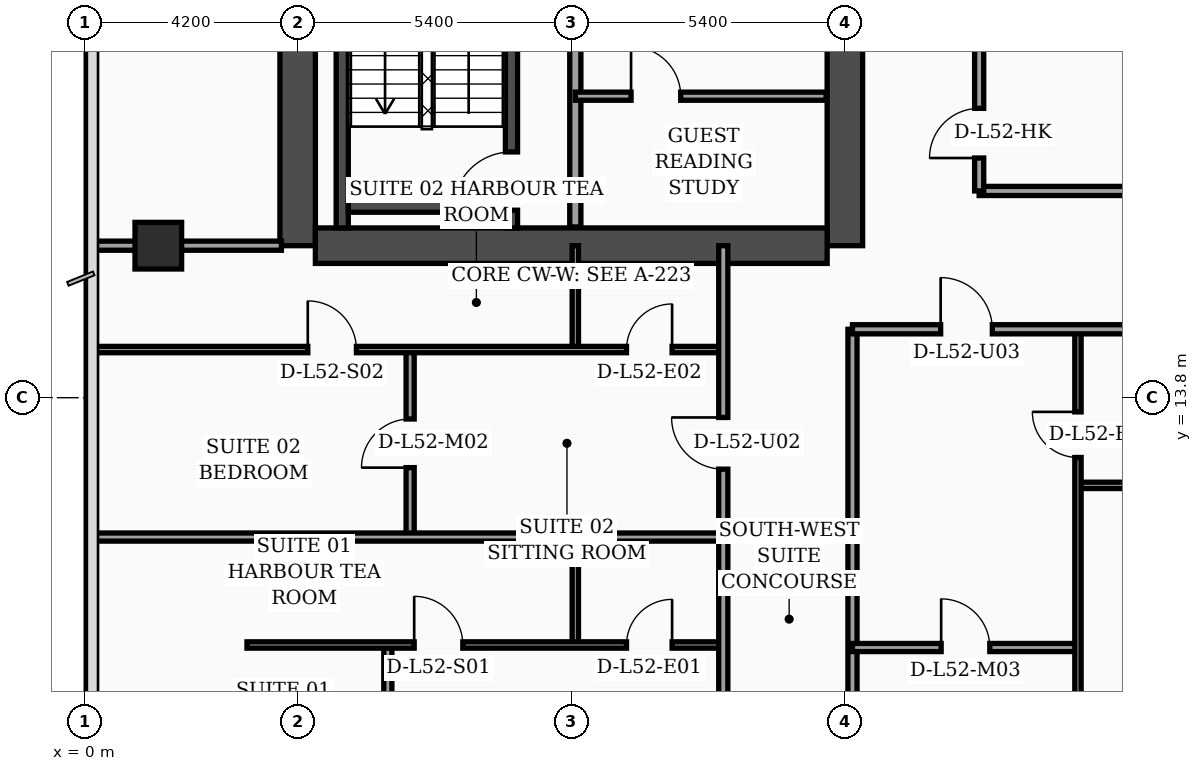
"""IFC4 building model, lengths in metres.
Left out: names, types, materials, properties, quantities, classifications, styles, units other than length and angle.
Written with IfcOpenShell. Run it as: python <this file> out.ifc"""

import sys

from ifc_helpers import new_model, si_unit, direction, frame, frame_2d, origin, origin_2d, place, context, subcontext, project, spatial, rectangle, extrude, element, fill, save


model = new_model("IFC4")
c1 = context("Model", 3, precision=1e-05, world=origin(), true_north=direction((0.0, 1.0)))
c2 = subcontext(c1, "Body", "Model", "MODEL_VIEW")
j1 = project(units=[si_unit("LENGTHUNIT", "METRE"), si_unit("PLANEANGLEUNIT", "RADIAN")], contexts=[c1])
p1 = place(None, origin())
s1 = spatial("IfcSite", under=j1, at=p1, CompositionType="ELEMENT")
p2 = place(p1, origin())
s2 = spatial("IfcBuilding", under=s1, at=p2, CompositionType="ELEMENT")
p3 = place(p2, frame((0.0, 0.0, 211.0)))
s3 = spatial("IfcBuildingStorey", under=s2, at=p3, CompositionType="ELEMENT", Elevation=211.0)
p4 = place(p3, frame((4.2, 16.8, 0.0), z_axis=(0.0, 0.0, 1.0), x_axis=(0.0, 1.0, 0.0)))
e1 = element("IfcWall", 1, at=p4, inside=s3, PredefinedType="SHEAR", context=c2, shape_type="SweptSolid", body=[
    extrude(rectangle(XDim=21.6, YDim=0.7, at=frame_2d((10.8, 0.0))), origin(), (0.0, 0.0, 1.0), 3.56),
])
p5 = place(p3, frame((15.0, 16.8, 0.0), z_axis=(0.0, 0.0, 1.0), x_axis=(0.0, 1.0, 0.0)))
e2 = element("IfcWall", 2, at=p5, inside=s3, PredefinedType="SHEAR", context=c2, shape_type="SweptSolid", body=[
    extrude(rectangle(XDim=21.6, YDim=0.7, at=frame_2d((10.8, 0.0))), origin(), (0.0, 0.0, 1.0), 3.56),
])
p6 = place(p5, frame((8.65, 0.0, 0.0)))
e3 = element("IfcOpeningElement", 3, at=p6, cuts=e2, PredefinedType="OPENING", context=c2, shape_type="SweptSolid", body=[
    extrude(rectangle(XDim=1.1, YDim=2.2, at=frame_2d((0.55, 1.1))), frame((0.0, 0.36, 0.0), z_axis=(0.0, -1.0, 0.0), x_axis=(1.0, 0.0, 0.0)), (0.0, 0.0, 1.0), 0.72),
])
p7 = place(p5, frame((10.85, 0.0, 0.0)))
e4 = element("IfcOpeningElement", 4, at=p7, cuts=e2, PredefinedType="OPENING", context=c2, shape_type="SweptSolid", body=[
    extrude(rectangle(XDim=1.1, YDim=2.2, at=frame_2d((0.55, 1.1))), frame((0.0, 0.36, 0.0), z_axis=(0.0, -1.0, 0.0), x_axis=(1.0, 0.0, 0.0)), (0.0, 0.0, 1.0), 0.72),
])
p8 = place(p5, frame((13.5, 0.0, 0.0)))
e5 = element("IfcOpeningElement", 5, at=p8, cuts=e2, PredefinedType="OPENING", context=c2, shape_type="SweptSolid", body=[
    extrude(rectangle(XDim=1.1, YDim=2.2, at=frame_2d((0.55, 1.1))), frame((0.0, 0.36, 0.0), z_axis=(0.0, -1.0, 0.0), x_axis=(1.0, 0.0, 0.0)), (0.0, 0.0, 1.0), 0.72),
])
p9 = place(p5, frame((16.15, 0.0, 0.0)))
e6 = element("IfcOpeningElement", 6, at=p9, cuts=e2, PredefinedType="OPENING", context=c2, shape_type="SweptSolid", body=[
    extrude(rectangle(XDim=1.1, YDim=2.2, at=frame_2d((0.55, 1.1))), frame((0.0, 0.36, 0.0), z_axis=(0.0, -1.0, 0.0), x_axis=(1.0, 0.0, 0.0)), (0.0, 0.0, 1.0), 0.72),
])
p10 = place(p3, frame((4.55, 16.8, 0.0), z_axis=(0.0, 0.0, 1.0), x_axis=(1.0, 0.0, 0.0)))
e7 = element("IfcWall", 7, at=p10, inside=s3, PredefinedType="SHEAR", context=c2, shape_type="SweptSolid", body=[
    extrude(rectangle(XDim=10.1, YDim=0.7, at=frame_2d((5.05, 0.0))), origin(), (0.0, 0.0, 1.0), 3.56),
])
p11 = place(p3, frame((5.08, 17.15, 0.0), z_axis=(0.0, 0.0, 1.0), x_axis=(0.0, 1.0, 0.0)))
e8 = element("IfcWall", 8, at=p11, inside=s3, PredefinedType="SOLIDWALL", context=c2, shape_type="SweptSolid", body=[
    extrude(rectangle(XDim=9.64, YDim=0.24, at=frame_2d((4.82, 0.0))), origin(), (0.0, 0.0, 1.0), 3.56),
])
p12 = place(p3, frame((8.42, 17.15, 0.0), z_axis=(0.0, 0.0, 1.0), x_axis=(0.0, 1.0, 0.0)))
e9 = element("IfcWall", 9, at=p12, inside=s3, PredefinedType="SOLIDWALL", context=c2, shape_type="SweptSolid", body=[
    extrude(rectangle(XDim=9.64, YDim=0.24, at=frame_2d((4.82, 0.0))), origin(), (0.0, 0.0, 1.0), 3.56),
])
p13 = place(p12, frame((0.35, 0.0, 0.0)))
e10 = element("IfcOpeningElement", 10, at=p13, cuts=e9, PredefinedType="OPENING", context=c2, shape_type="SweptSolid", body=[
    extrude(rectangle(XDim=1.15, YDim=2.2, at=frame_2d((0.575, 1.1))), frame((0.0, 0.13, 0.0), z_axis=(0.0, -1.0, 0.0), x_axis=(1.0, 0.0, 0.0)), (0.0, 0.0, 1.0), 0.26),
])
p14 = place(p3, frame((5.2, 17.58, 0.0), z_axis=(0.0, 0.0, 1.0), x_axis=(1.0, 0.0, 0.0)))
e11 = element("IfcWall", 11, at=p14, inside=s3, PredefinedType="SOLIDWALL", context=c2, shape_type="SweptSolid", body=[
    extrude(rectangle(XDim=3.1, YDim=0.24, at=frame_2d((1.55, 0.0))), origin(), (0.0, 0.0, 1.0), 3.56),
])
p15 = place(p3, frame((1.45, 16.8, 0.0), z_axis=(0.0, 0.0, 1.0), x_axis=(1.0, 0.0, 0.0)))
e12 = element("IfcColumn", 12, at=p15, inside=s3, PredefinedType="COLUMN", context=c2, shape_type="SweptSolid", body=[
    extrude(rectangle(XDim=0.92, YDim=0.92, at=origin_2d()), origin(), (0.0, 0.0, 1.0), 3.56),
])
p16 = place(p3, frame((9.68, 17.17, 0.0), z_axis=(0.0, 0.0, 1.0), x_axis=(0.0, 1.0, 0.0)))
e13 = element("IfcWall", 13, at=p16, inside=s3, PredefinedType="SOLIDWALL", context=c2, shape_type="SweptSolid", body=[
    extrude(rectangle(XDim=7.83, YDim=0.22, at=frame_2d((3.915, 0.0))), origin(), (0.0, 0.0, 1.0), 3.56),
])
p17 = place(p3, frame((9.68, 19.75, 0.0), z_axis=(0.0, 0.0, 1.0), x_axis=(1.0, 0.0, 0.0)))
e14 = element("IfcWall", 14, at=p17, inside=s3, PredefinedType="PARTITIONING", context=c2, shape_type="SweptSolid", body=[
    extrude(rectangle(XDim=4.95, YDim=0.16, at=frame_2d((2.475, 0.0))), origin(), (0.0, 0.0, 1.0), 3.56),
])
p18 = place(p17, frame((1.1, 0.0, 0.0)))
e15 = element("IfcOpeningElement", 15, at=p18, cuts=e14, PredefinedType="OPENING", context=c2, shape_type="SweptSolid", body=[
    extrude(rectangle(XDim=0.98, YDim=2.15, at=frame_2d((0.49, 1.075))), frame((0.0, 0.09, 0.0), z_axis=(0.0, -1.0, 0.0), x_axis=(1.0, 0.0, 0.0)), (0.0, 0.0, 1.0), 0.18),
])
p19 = place(p3, frame((0.08, 16.8, 0.0), z_axis=(0.0, 0.0, 1.0), x_axis=(1.0, 0.0, 0.0)))
e16 = element("IfcWall", 16, at=p19, inside=s3, PredefinedType="PARTITIONING", context=c2, shape_type="SweptSolid", body=[
    extrude(rectangle(XDim=3.8, YDim=0.18, at=frame_2d((1.9, 0.0))), origin(), (0.0, 0.0, 1.0), 2.94),
])
p20 = place(p3, frame((9.68, 8.92, 0.0), z_axis=(0.0, 0.0, 1.0), x_axis=(0.0, 1.0, 0.0)))
e17 = element("IfcWall", 17, at=p20, inside=s3, PredefinedType="PARTITIONING", context=c2, shape_type="SweptSolid", body=[
    extrude(rectangle(XDim=2.13, YDim=0.125, at=frame_2d((1.065, 0.0))), origin(), (0.0, 0.0, 1.0), 3.09),
])
p21 = place(p3, frame((5.98, 2.44, 0.0), z_axis=(0.0, 0.0, 1.0), x_axis=(0.0, 1.0, 0.0)))
e18 = element("IfcWall", 18, at=p21, inside=s3, PredefinedType="PARTITIONING", context=c2, shape_type="SweptSolid", body=[
    extrude(rectangle(XDim=6.48, YDim=0.16, at=frame_2d((3.24, 0.0))), origin(), (0.0, 0.0, 1.0), 3.09),
])
p22 = place(p21, frame((2.76, 0.0, 0.0)))
e19 = element("IfcOpeningElement", 19, at=p22, cuts=e18, PredefinedType="OPENING", context=c2, shape_type="SweptSolid", body=[
    extrude(rectangle(XDim=0.96, YDim=2.2, at=frame_2d((0.48, 1.1))), frame((0.0, 0.09, 0.0), z_axis=(0.0, -1.0, 0.0), x_axis=(1.0, 0.0, 0.0)), (0.0, 0.0, 1.0), 0.18),
])
p23 = place(p3, frame((3.2, 8.92, 0.0), z_axis=(0.0, 0.0, 1.0), x_axis=(1.0, 0.0, 0.0)))
e20 = element("IfcWall", 20, at=p23, inside=s3, PredefinedType="PARTITIONING", context=c2, shape_type="SweptSolid", body=[
    extrude(rectangle(XDim=9.4, YDim=0.125, at=frame_2d((4.7, 0.0))), origin(), (0.0, 0.0, 1.0), 2.94),
])
p24 = place(p23, frame((3.3, 0.0, 0.0)))
e21 = element("IfcOpeningElement", 21, at=p24, cuts=e20, PredefinedType="OPENING", context=c2, shape_type="SweptSolid", body=[
    extrude(rectangle(XDim=0.96, YDim=2.2, at=frame_2d((0.48, 1.1))), frame((0.0, 0.073, 0.0), z_axis=(0.0, -1.0, 0.0), x_axis=(1.0, 0.0, 0.0)), (0.0, 0.0, 1.0), 0.145),
])
p25 = place(p23, frame((7.49, 0.0, 0.0)))
e22 = element("IfcOpeningElement", 22, at=p25, cuts=e20, PredefinedType="OPENING", context=c2, shape_type="SweptSolid", body=[
    extrude(rectangle(XDim=0.9, YDim=2.15, at=frame_2d((0.45, 1.075))), frame((0.0, 0.073, 0.0), z_axis=(0.0, -1.0, 0.0), x_axis=(1.0, 0.0, 0.0)), (0.0, 0.0, 1.0), 0.145),
])
p26 = place(p3, frame((9.68, 14.75, 0.0), z_axis=(0.0, 0.0, 1.0), x_axis=(0.0, 1.0, 0.0)))
e23 = element("IfcWall", 23, at=p26, inside=s3, PredefinedType="PARTITIONING", context=c2, shape_type="SweptSolid", body=[
    extrude(rectangle(XDim=2.05, YDim=0.125, at=frame_2d((1.025, 0.0))), origin(), (0.0, 0.0, 1.0), 3.56),
])
p27 = place(p3, frame((6.42, 11.05, 0.0), z_axis=(0.0, 0.0, 1.0), x_axis=(0.0, 1.0, 0.0)))
e24 = element("IfcWall", 24, at=p27, inside=s3, PredefinedType="PARTITIONING", context=c2, shape_type="SweptSolid", body=[
    extrude(rectangle(XDim=3.7, YDim=0.16, at=frame_2d((1.85, 0.0))), origin(), (0.0, 0.0, 1.0), 3.56),
])
p28 = place(p27, frame((1.37, 0.0, 0.0)))
e25 = element("IfcOpeningElement", 25, at=p28, cuts=e24, PredefinedType="OPENING", context=c2, shape_type="SweptSolid", body=[
    extrude(rectangle(XDim=0.96, YDim=2.2, at=frame_2d((0.48, 1.1))), frame((0.0, 0.09, 0.0), z_axis=(0.0, -1.0, 0.0), x_axis=(1.0, 0.0, 0.0)), (0.0, 0.0, 1.0), 0.18),
])
p29 = place(p3, frame((0.08, 14.75, 0.0), z_axis=(0.0, 0.0, 1.0), x_axis=(1.0, 0.0, 0.0)))
e26 = element("IfcWall", 26, at=p29, inside=s3, PredefinedType="PARTITIONING", context=c2, shape_type="SweptSolid", body=[
    extrude(rectangle(XDim=12.52, YDim=0.125, at=frame_2d((6.26, 0.0))), origin(), (0.0, 0.0, 1.0), 2.94),
])
p30 = place(p29, frame((4.32, 0.0, 0.0)))
e27 = element("IfcOpeningElement", 27, at=p30, cuts=e26, PredefinedType="OPENING", context=c2, shape_type="SweptSolid", body=[
    extrude(rectangle(XDim=0.96, YDim=2.2, at=frame_2d((0.48, 1.1))), frame((0.0, 0.073, 0.0), z_axis=(0.0, -1.0, 0.0), x_axis=(1.0, 0.0, 0.0)), (0.0, 0.0, 1.0), 0.145),
])
p31 = place(p29, frame((10.61, 0.0, 0.0)))
e28 = element("IfcOpeningElement", 28, at=p31, cuts=e26, PredefinedType="OPENING", context=c2, shape_type="SweptSolid", body=[
    extrude(rectangle(XDim=0.9, YDim=2.15, at=frame_2d((0.45, 1.075))), frame((0.0, 0.073, 0.0), z_axis=(0.0, -1.0, 0.0), x_axis=(1.0, 0.0, 0.0)), (0.0, 0.0, 1.0), 0.145),
])
p32 = place(p3, frame((0.08, 11.05, 0.0), z_axis=(0.0, 0.0, 1.0), x_axis=(1.0, 0.0, 0.0)))
e29 = element("IfcWall", 29, at=p32, inside=s3, PredefinedType="PARTITIONING", context=c2, shape_type="SweptSolid", body=[
    extrude(rectangle(XDim=12.52, YDim=0.16, at=frame_2d((6.26, 0.0))), origin(), (0.0, 0.0, 1.0), 2.94),
])
p33 = place(p3, frame((12.6, 2.44, 0.0), z_axis=(0.0, 0.0, 1.0), x_axis=(0.0, 1.0, 0.0)))
e30 = element("IfcWall", 30, at=p33, inside=s3, PredefinedType="PARTITIONING", context=c2, shape_type="SweptSolid", body=[
    extrude(rectangle(XDim=14.36, YDim=0.18, at=frame_2d((7.18, 0.0))), origin(), (0.0, 0.0, 1.0), 2.94),
])
p34 = place(p33, frame((3.01, 0.0, 0.0)))
e31 = element("IfcOpeningElement", 31, at=p34, cuts=e30, PredefinedType="OPENING", context=c2, shape_type="SweptSolid", body=[
    extrude(rectangle(XDim=1.02, YDim=2.2, at=frame_2d((0.51, 1.1))), frame((0.0, 0.1, 0.0), z_axis=(0.0, -1.0, 0.0), x_axis=(1.0, 0.0, 0.0)), (0.0, 0.0, 1.0), 0.2),
])
p35 = place(p33, frame((9.95, 0.0, 0.0)))
e32 = element("IfcOpeningElement", 32, at=p35, cuts=e30, PredefinedType="OPENING", context=c2, shape_type="SweptSolid", body=[
    extrude(rectangle(XDim=1.02, YDim=2.2, at=frame_2d((0.51, 1.1))), frame((0.0, 0.1, 0.0), z_axis=(0.0, -1.0, 0.0), x_axis=(1.0, 0.0, 0.0)), (0.0, 0.0, 1.0), 0.2),
])
p36 = place(p3, frame((15.15, 2.44, 0.0), z_axis=(0.0, 0.0, 1.0), x_axis=(0.0, 1.0, 0.0)))
e33 = element("IfcWall", 33, at=p36, inside=s3, PredefinedType="PARTITIONING", context=c2, shape_type="SweptSolid", body=[
    extrude(rectangle(XDim=12.71, YDim=0.18, at=frame_2d((6.355, 0.0))), origin(), (0.0, 0.0, 1.0), 3.09),
])
p37 = place(p3, frame((19.6, 12.07, 0.0), z_axis=(0.0, 0.0, 1.0), x_axis=(1.0, 0.0, 0.0)))
e34 = element("IfcWall", 34, at=p37, inside=s3, PredefinedType="PARTITIONING", context=c2, shape_type="SweptSolid", body=[
    extrude(rectangle(XDim=2.0, YDim=0.125, at=frame_2d((1.0, 0.0))), origin(), (0.0, 0.0, 1.0), 3.56),
])
p38 = place(p3, frame((15.15, 8.87, 0.0), z_axis=(0.0, 0.0, 1.0), x_axis=(1.0, 0.0, 0.0)))
e35 = element("IfcWall", 35, at=p38, inside=s3, PredefinedType="PARTITIONING", context=c2, shape_type="SweptSolid", body=[
    extrude(rectangle(XDim=4.45, YDim=0.16, at=frame_2d((2.225, 0.0))), origin(), (0.0, 0.0, 1.0), 3.56),
])
p39 = place(p38, frame((1.75, 0.0, 0.0)))
e36 = element("IfcOpeningElement", 36, at=p39, cuts=e35, PredefinedType="OPENING", context=c2, shape_type="SweptSolid", body=[
    extrude(rectangle(XDim=0.96, YDim=2.2, at=frame_2d((0.48, 1.1))), frame((0.0, 0.09, 0.0), z_axis=(0.0, -1.0, 0.0), x_axis=(1.0, 0.0, 0.0)), (0.0, 0.0, 1.0), 0.18),
])
p40 = place(p3, frame((19.6, 2.44, 0.0), z_axis=(0.0, 0.0, 1.0), x_axis=(0.0, 1.0, 0.0)))
e37 = element("IfcWall", 37, at=p40, inside=s3, PredefinedType="PARTITIONING", context=c2, shape_type="SweptSolid", body=[
    extrude(rectangle(XDim=12.71, YDim=0.125, at=frame_2d((6.355, 0.0))), origin(), (0.0, 0.0, 1.0), 2.59),
])
p41 = place(p40, frame((4.34, 0.0, 0.0)))
e38 = element("IfcOpeningElement", 38, at=p41, cuts=e37, PredefinedType="OPENING", context=c2, shape_type="SweptSolid", body=[
    extrude(rectangle(XDim=0.96, YDim=2.2, at=frame_2d((0.48, 1.1))), frame((0.0, 0.073, 0.0), z_axis=(0.0, -1.0, 0.0), x_axis=(1.0, 0.0, 0.0)), (0.0, 0.0, 1.0), 0.145),
])
p42 = place(p40, frame((10.18, 0.0, 0.0)))
e39 = element("IfcOpeningElement", 39, at=p42, cuts=e37, PredefinedType="OPENING", context=c2, shape_type="SweptSolid", body=[
    extrude(rectangle(XDim=0.9, YDim=2.15, at=frame_2d((0.45, 1.075))), frame((0.0, 0.073, 0.0), z_axis=(0.0, -1.0, 0.0), x_axis=(1.0, 0.0, 0.0)), (0.0, 0.0, 1.0), 0.145),
])
p43 = place(p3, frame((15.15, 15.15, 0.0), z_axis=(0.0, 0.0, 1.0), x_axis=(1.0, 0.0, 0.0)))
e40 = element("IfcWall", 40, at=p43, inside=s3, PredefinedType="PARTITIONING", context=c2, shape_type="SweptSolid", body=[
    extrude(rectangle(XDim=6.45, YDim=0.18, at=frame_2d((3.225, 0.0))), origin(), (0.0, 0.0, 1.0), 2.59),
])
p44 = place(p43, frame((1.74, 0.0, 0.0)))
e41 = element("IfcOpeningElement", 41, at=p44, cuts=e40, PredefinedType="OPENING", context=c2, shape_type="SweptSolid", body=[
    extrude(rectangle(XDim=1.02, YDim=2.2, at=frame_2d((0.51, 1.1))), frame((0.0, 0.1, 0.0), z_axis=(0.0, -1.0, 0.0), x_axis=(1.0, 0.0, 0.0)), (0.0, 0.0, 1.0), 0.2),
])
p45 = place(p3, frame((17.65, 17.88, 0.0), z_axis=(0.0, 0.0, 1.0), x_axis=(1.0, 0.0, 0.0)))
e42 = element("IfcWall", 42, at=p45, inside=s3, PredefinedType="PARTITIONING", context=c2, shape_type="SweptSolid", body=[
    extrude(rectangle(XDim=3.9, YDim=0.18, at=frame_2d((1.95, 0.0))), origin(), (0.0, 0.0, 1.0), 3.56),
])
p46 = place(p3, frame((17.65, 17.88, 0.0), z_axis=(0.0, 0.0, 1.0), x_axis=(0.0, 1.0, 0.0)))
e43 = element("IfcWall", 43, at=p46, inside=s3, PredefinedType="PARTITIONING", context=c2, shape_type="SweptSolid", body=[
    extrude(rectangle(XDim=6.44, YDim=0.18, at=frame_2d((3.22, 0.0))), origin(), (0.0, 0.0, 1.0), 3.56),
])
p47 = place(p46, frame((0.65, 0.0, 0.0)))
e44 = element("IfcOpeningElement", 44, at=p47, cuts=e43, PredefinedType="OPENING", context=c2, shape_type="SweptSolid", body=[
    extrude(rectangle(XDim=0.98, YDim=2.15, at=frame_2d((0.49, 1.075))), frame((0.0, 0.1, 0.0), z_axis=(0.0, -1.0, 0.0), x_axis=(1.0, 0.0, 0.0)), (0.0, 0.0, 1.0), 0.2),
])
p48 = place(p46, frame((3.97, 0.0, 0.0)))
e45 = element("IfcOpeningElement", 45, at=p48, cuts=e43, PredefinedType="OPENING", context=c2, shape_type="SweptSolid", body=[
    extrude(rectangle(XDim=0.96, YDim=2.2, at=frame_2d((0.48, 1.1))), frame((0.0, 0.1, 0.0), z_axis=(0.0, -1.0, 0.0), x_axis=(1.0, 0.0, 0.0)), (0.0, 0.0, 1.0), 0.2),
])
p49 = place(p18, origin())
e46 = element("IfcDoor", 46, at=p49, inside=s3, OperationType="SINGLE_SWING_LEFT", PredefinedType="DOOR", context=c2, shape_type="SweptSolid", body=[
    extrude(rectangle(XDim=0.98, YDim=2.15, at=frame_2d((0.49, 1.075))), frame((0.0, 0.025, 0.0), z_axis=(0.0, -1.0, 0.0), x_axis=(1.0, 0.0, 0.0)), (0.0, 0.0, 1.0), 0.05),
])
fill(e15, e46)
p50 = place(p24, origin())
e47 = element("IfcDoor", 47, at=p50, inside=s3, OperationType="SINGLE_SWING_LEFT", PredefinedType="DOOR", context=c2, shape_type="SweptSolid", body=[
    extrude(rectangle(XDim=0.96, YDim=2.2, at=frame_2d((0.48, 1.1))), frame((0.0, 0.025, 0.0), z_axis=(0.0, -1.0, 0.0), x_axis=(1.0, 0.0, 0.0)), (0.0, 0.0, 1.0), 0.05),
])
fill(e21, e47)
p51 = place(p25, origin())
e48 = element("IfcDoor", 48, at=p51, inside=s3, OperationType="SINGLE_SWING_RIGHT", PredefinedType="DOOR", context=c2, shape_type="SweptSolid", body=[
    extrude(rectangle(XDim=0.9, YDim=2.15, at=frame_2d((0.45, 1.075))), frame((0.0, 0.025, 0.0), z_axis=(0.0, -1.0, 0.0), x_axis=(1.0, 0.0, 0.0)), (0.0, 0.0, 1.0), 0.05),
])
fill(e22, e48)
p52 = place(p28, origin())
e49 = element("IfcDoor", 49, at=p52, inside=s3, OperationType="SINGLE_SWING_LEFT", PredefinedType="DOOR", context=c2, shape_type="SweptSolid", body=[
    extrude(rectangle(XDim=0.96, YDim=2.2, at=frame_2d((0.48, 1.1))), frame((0.0, 0.025, 0.0), z_axis=(0.0, -1.0, 0.0), x_axis=(1.0, 0.0, 0.0)), (0.0, 0.0, 1.0), 0.05),
])
fill(e25, e49)
p53 = place(p30, origin())
e50 = element("IfcDoor", 50, at=p53, inside=s3, OperationType="SINGLE_SWING_LEFT", PredefinedType="DOOR", context=c2, shape_type="SweptSolid", body=[
    extrude(rectangle(XDim=0.96, YDim=2.2, at=frame_2d((0.48, 1.1))), frame((0.0, 0.025, 0.0), z_axis=(0.0, -1.0, 0.0), x_axis=(1.0, 0.0, 0.0)), (0.0, 0.0, 1.0), 0.05),
])
fill(e27, e50)
p54 = place(p31, origin())
e51 = element("IfcDoor", 51, at=p54, inside=s3, OperationType="SINGLE_SWING_RIGHT", PredefinedType="DOOR", context=c2, shape_type="SweptSolid", body=[
    extrude(rectangle(XDim=0.9, YDim=2.15, at=frame_2d((0.45, 1.075))), frame((0.0, 0.025, 0.0), z_axis=(0.0, -1.0, 0.0), x_axis=(1.0, 0.0, 0.0)), (0.0, 0.0, 1.0), 0.05),
])
fill(e28, e51)
p55 = place(p35, origin())
e52 = element("IfcDoor", 52, at=p55, inside=s3, OperationType="SINGLE_SWING_RIGHT", PredefinedType="DOOR", context=c2, shape_type="SweptSolid", body=[
    extrude(rectangle(XDim=1.02, YDim=2.2, at=frame_2d((0.51, 1.1))), frame((0.0, 0.025, 0.0), z_axis=(0.0, -1.0, 0.0), x_axis=(1.0, 0.0, 0.0)), (0.0, 0.0, 1.0), 0.05),
])
fill(e32, e52)
p56 = place(p39, origin())
e53 = element("IfcDoor", 53, at=p56, inside=s3, OperationType="SINGLE_SWING_LEFT", PredefinedType="DOOR", context=c2, shape_type="SweptSolid", body=[
    extrude(rectangle(XDim=0.96, YDim=2.2, at=frame_2d((0.48, 1.1))), frame((0.0, 0.025, 0.0), z_axis=(0.0, -1.0, 0.0), x_axis=(1.0, 0.0, 0.0)), (0.0, 0.0, 1.0), 0.05),
])
fill(e36, e53)
p57 = place(p42, origin())
e54 = element("IfcDoor", 54, at=p57, inside=s3, OperationType="SINGLE_SWING_RIGHT", PredefinedType="DOOR", context=c2, shape_type="SweptSolid", body=[
    extrude(rectangle(XDim=0.9, YDim=2.15, at=frame_2d((0.45, 1.075))), frame((0.0, 0.025, 0.0), z_axis=(0.0, -1.0, 0.0), x_axis=(1.0, 0.0, 0.0)), (0.0, 0.0, 1.0), 0.05),
])
fill(e39, e54)
p58 = place(p44, origin())
e55 = element("IfcDoor", 55, at=p58, inside=s3, OperationType="SINGLE_SWING_LEFT", PredefinedType="DOOR", context=c2, shape_type="SweptSolid", body=[
    extrude(rectangle(XDim=1.02, YDim=2.2, at=frame_2d((0.51, 1.1))), frame((0.0, 0.025, 0.0), z_axis=(0.0, -1.0, 0.0), x_axis=(1.0, 0.0, 0.0)), (0.0, 0.0, 1.0), 0.05),
])
fill(e41, e55)
p59 = place(p47, origin())
e56 = element("IfcDoor", 56, at=p59, inside=s3, OperationType="SINGLE_SWING_LEFT", PredefinedType="DOOR", context=c2, shape_type="SweptSolid", body=[
    extrude(rectangle(XDim=0.98, YDim=2.15, at=frame_2d((0.49, 1.075))), frame((0.0, 0.025, 0.0), z_axis=(0.0, -1.0, 0.0), x_axis=(1.0, 0.0, 0.0)), (0.0, 0.0, 1.0), 0.05),
])
fill(e44, e56)
p60 = place(p13, origin())
e57 = element("IfcDoor", 57, at=p60, inside=s3, OperationType="SINGLE_SWING_LEFT", PredefinedType="DOOR", context=c2, shape_type="SweptSolid", body=[
    extrude(rectangle(XDim=1.15, YDim=2.2, at=frame_2d((0.575, 1.1))), frame((0.0, 0.025, 0.0), z_axis=(0.0, -1.0, 0.0), x_axis=(1.0, 0.0, 0.0)), (0.0, 0.0, 1.0), 0.05),
])
fill(e10, e57)
save(model, sys.argv[1])
